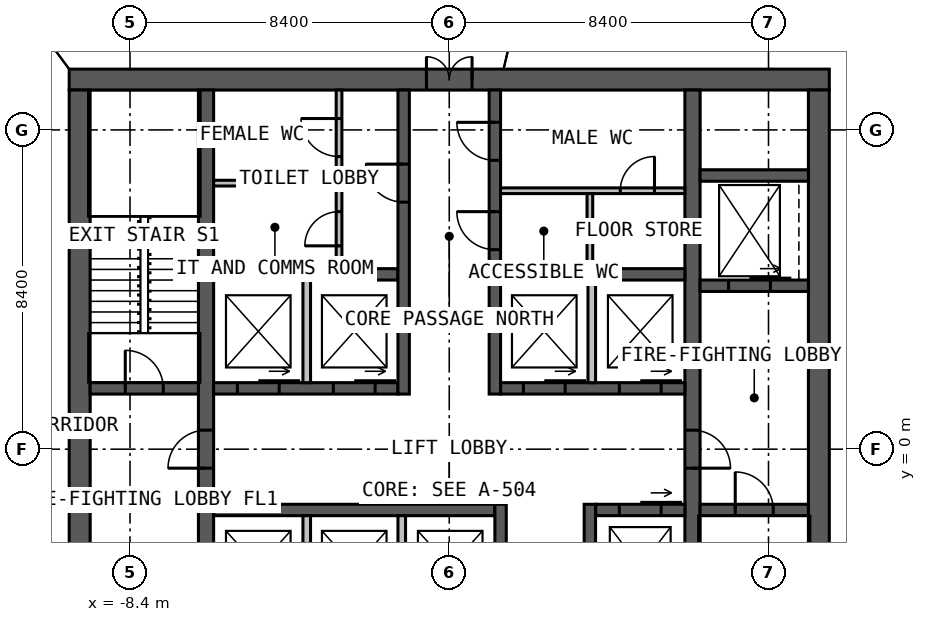
"""IFC4 building model, lengths in metres.
Left out: names, types, materials, properties, quantities, classifications, styles, units other than length and angle.
Written with IfcOpenShell. Run it as: python <this file> out.ifc"""

import sys

from ifc_helpers import new_model, si_unit, direction, frame, frame_2d, origin, place, context, subcontext, project, spatial, rectangle, extrude, element, fill, save


model = new_model("IFC4")
c1 = context("Model", 3, precision=1e-05, world=origin(), true_north=direction((0.0, 1.0)))
c2 = subcontext(c1, "Body", "Model", "MODEL_VIEW")
j1 = project(units=[si_unit("LENGTHUNIT", "METRE"), si_unit("PLANEANGLEUNIT", "RADIAN")], contexts=[c1])
p1 = place(None, origin())
s1 = spatial("IfcSite", under=j1, at=p1, CompositionType="ELEMENT")
p2 = place(p1, origin())
s2 = spatial("IfcBuilding", under=s1, at=p2, CompositionType="ELEMENT")
p3 = place(p2, frame((0.0, 0.0, 106.0)))
s3 = spatial("IfcBuildingStorey", under=s2, at=p3, CompositionType="ELEMENT", Elevation=106.0)
p4 = place(p3, frame((-10.0, 9.725, 0.0), z_axis=(0.0, 0.0, 1.0), x_axis=(1.0, 0.0, 0.0)))
e1 = element("IfcWall", 1, at=p4, inside=s3, PredefinedType="SOLIDWALL", context=c2, shape_type="SweptSolid", body=[
    extrude(rectangle(XDim=20.0, YDim=0.55, at=frame_2d((10.0, 0.0))), origin(), (0.0, 0.0, 1.0), 4.0),
])
p5 = place(p4, frame((9.4, 0.0, 0.0)))
e2 = element("IfcOpeningElement", 2, at=p5, cuts=e1, PredefinedType="OPENING", context=c2, shape_type="SweptSolid", body=[
    extrude(rectangle(XDim=1.2, YDim=2.2, at=frame_2d((0.6, 1.1))), frame((0.0, 0.285, 0.0), z_axis=(0.0, -1.0, 0.0), x_axis=(1.0, 0.0, 0.0)), (0.0, 0.0, 1.0), 0.57),
])
for number, where, z_axis, x_axis in (
    (3, (9.725, -9.45, 0.0), (0.0, 0.0, 1.0), (0.0, 1.0, 0.0)),
    (4, (-9.725, 9.45, 0.0), (0.0, 0.0, 1.0), (0.0, -1.0, 0.0)),
):
    element("IfcWall", number, at=place(p3, frame(where, z_axis=z_axis, x_axis=x_axis)), inside=s3, PredefinedType="SOLIDWALL", context=c2, shape_type="SweptSolid", body=[
        extrude(rectangle(XDim=18.9, YDim=0.55, at=frame_2d((9.45, 0.0))), origin(), (0.0, 0.0, 1.0), 4.0),
    ])
p6 = place(p3, frame((-6.4, -9.45, 0.0), z_axis=(0.0, 0.0, 1.0), x_axis=(0.0, 1.0, 0.0)))
e5 = element("IfcWall", 5, at=p6, inside=s3, PredefinedType="SOLIDWALL", context=c2, shape_type="SweptSolid", body=[
    extrude(rectangle(XDim=18.9, YDim=0.4, at=frame_2d((9.45, 0.0))), origin(), (0.0, 0.0, 1.0), 4.0),
])
p7 = place(p6, frame((8.95, 0.0, 0.0)))
e6 = element("IfcOpeningElement", 6, at=p7, cuts=e5, PredefinedType="OPENING", context=c2, shape_type="SweptSolid", body=[
    extrude(rectangle(XDim=1.0, YDim=2.2, at=frame_2d((0.5, 1.1))), frame((0.0, 0.21, 0.0), z_axis=(0.0, -1.0, 0.0), x_axis=(1.0, 0.0, 0.0)), (0.0, 0.0, 1.0), 0.42),
])
p8 = place(p3, frame((6.4, 9.45, 0.0), z_axis=(0.0, 0.0, 1.0), x_axis=(0.0, -1.0, 0.0)))
e7 = element("IfcWall", 7, at=p8, inside=s3, PredefinedType="SOLIDWALL", context=c2, shape_type="SweptSolid", body=[
    extrude(rectangle(XDim=18.9, YDim=0.4, at=frame_2d((9.45, 0.0))), origin(), (0.0, 0.0, 1.0), 4.0),
])
p9 = place(p8, frame((8.95, 0.0, 0.0)))
e8 = element("IfcOpeningElement", 8, at=p9, cuts=e7, PredefinedType="OPENING", context=c2, shape_type="SweptSolid", body=[
    extrude(rectangle(XDim=1.0, YDim=2.2, at=frame_2d((0.5, 1.1))), frame((0.0, 0.21, 0.0), z_axis=(0.0, -1.0, 0.0), x_axis=(1.0, 0.0, 0.0)), (0.0, 0.0, 1.0), 0.42),
])
p10 = place(p3, frame((-6.2, 1.6, 0.0), z_axis=(0.0, 0.0, 1.0), x_axis=(1.0, 0.0, 0.0)))
e9 = element("IfcWall", 9, at=p10, inside=s3, PredefinedType="SOLIDWALL", context=c2, shape_type="SweptSolid", body=[
    extrude(rectangle(XDim=4.85, YDim=0.3, at=frame_2d((2.425, 0.0))), origin(), (0.0, 0.0, 1.0), 4.0),
])
p11 = place(p10, frame((0.625, 0.0, 0.0)))
e10 = element("IfcOpeningElement", 10, at=p11, cuts=e9, PredefinedType="OPENING", context=c2, shape_type="SweptSolid", body=[
    extrude(rectangle(XDim=1.1, YDim=2.2, at=frame_2d((0.55, 1.1))), frame((0.0, 0.16, 0.0), z_axis=(0.0, -1.0, 0.0), x_axis=(1.0, 0.0, 0.0)), (0.0, 0.0, 1.0), 0.32),
])
p12 = place(p10, frame((3.15, 0.0, 0.0)))
e11 = element("IfcOpeningElement", 11, at=p12, cuts=e9, PredefinedType="OPENING", context=c2, shape_type="SweptSolid", body=[
    extrude(rectangle(XDim=1.1, YDim=2.2, at=frame_2d((0.55, 1.1))), frame((0.0, 0.16, 0.0), z_axis=(0.0, -1.0, 0.0), x_axis=(1.0, 0.0, 0.0)), (0.0, 0.0, 1.0), 0.32),
])
p13 = place(p3, frame((1.35, 1.6, 0.0), z_axis=(0.0, 0.0, 1.0), x_axis=(1.0, 0.0, 0.0)))
e12 = element("IfcWall", 12, at=p13, inside=s3, PredefinedType="SOLIDWALL", context=c2, shape_type="SweptSolid", body=[
    extrude(rectangle(XDim=4.85, YDim=0.3, at=frame_2d((2.425, 0.0))), origin(), (0.0, 0.0, 1.0), 4.0),
])
p14 = place(p13, frame((0.6, 0.0, 0.0)))
e13 = element("IfcOpeningElement", 13, at=p14, cuts=e12, PredefinedType="OPENING", context=c2, shape_type="SweptSolid", body=[
    extrude(rectangle(XDim=1.1, YDim=2.2, at=frame_2d((0.55, 1.1))), frame((0.0, 0.16, 0.0), z_axis=(0.0, -1.0, 0.0), x_axis=(1.0, 0.0, 0.0)), (0.0, 0.0, 1.0), 0.32),
])
p15 = place(p13, frame((3.125, 0.0, 0.0)))
e14 = element("IfcOpeningElement", 14, at=p15, cuts=e12, PredefinedType="OPENING", context=c2, shape_type="SweptSolid", body=[
    extrude(rectangle(XDim=1.1, YDim=2.2, at=frame_2d((0.55, 1.1))), frame((0.0, 0.16, 0.0), z_axis=(0.0, -1.0, 0.0), x_axis=(1.0, 0.0, 0.0)), (0.0, 0.0, 1.0), 0.32),
])
for number, where, z_axis, x_axis in (
    (15, (-6.2, 4.6, 0.0), (0.0, 0.0, 1.0), (1.0, 0.0, 0.0)),
    (16, (1.35, 4.6, 0.0), (0.0, 0.0, 1.0), (1.0, 0.0, 0.0)),
):
    element("IfcWall", number, at=place(p3, frame(where, z_axis=z_axis, x_axis=x_axis)), inside=s3, PredefinedType="SOLIDWALL", context=c2, shape_type="SweptSolid", body=[
        extrude(rectangle(XDim=4.85, YDim=0.3, at=frame_2d((2.425, 0.0))), origin(), (0.0, 0.0, 1.0), 4.0),
    ])
p16 = place(p3, frame((-1.2, 1.45, 0.0), z_axis=(0.0, 0.0, 1.0), x_axis=(0.0, 1.0, 0.0)))
e17 = element("IfcWall", 17, at=p16, inside=s3, PredefinedType="SOLIDWALL", context=c2, shape_type="SweptSolid", body=[
    extrude(rectangle(XDim=8.0, YDim=0.3, at=frame_2d((4.0, 0.0))), origin(), (0.0, 0.0, 1.0), 4.0),
])
p17 = place(p16, frame((5.05, 0.0, 0.0)))
e18 = element("IfcOpeningElement", 18, at=p17, cuts=e17, PredefinedType="OPENING", context=c2, shape_type="SweptSolid", body=[
    extrude(rectangle(XDim=1.0, YDim=2.2, at=frame_2d((0.5, 1.1))), frame((0.0, 0.16, 0.0), z_axis=(0.0, -1.0, 0.0), x_axis=(1.0, 0.0, 0.0)), (0.0, 0.0, 1.0), 0.32),
])
p18 = place(p3, frame((1.2, 1.45, 0.0), z_axis=(0.0, 0.0, 1.0), x_axis=(0.0, 1.0, 0.0)))
e19 = element("IfcWall", 19, at=p18, inside=s3, PredefinedType="SOLIDWALL", context=c2, shape_type="SweptSolid", body=[
    extrude(rectangle(XDim=8.0, YDim=0.3, at=frame_2d((4.0, 0.0))), origin(), (0.0, 0.0, 1.0), 4.0),
])
p19 = place(p18, frame((3.8, 0.0, 0.0)))
e20 = element("IfcOpeningElement", 20, at=p19, cuts=e19, PredefinedType="OPENING", context=c2, shape_type="SweptSolid", body=[
    extrude(rectangle(XDim=1.0, YDim=2.2, at=frame_2d((0.5, 1.1))), frame((0.0, 0.16, 0.0), z_axis=(0.0, -1.0, 0.0), x_axis=(1.0, 0.0, 0.0)), (0.0, 0.0, 1.0), 0.32),
])
p20 = place(p18, frame((6.15, 0.0, 0.0)))
e21 = element("IfcOpeningElement", 21, at=p20, cuts=e19, PredefinedType="OPENING", context=c2, shape_type="SweptSolid", body=[
    extrude(rectangle(XDim=1.0, YDim=2.2, at=frame_2d((0.5, 1.1))), frame((0.0, 0.16, 0.0), z_axis=(0.0, -1.0, 0.0), x_axis=(1.0, 0.0, 0.0)), (0.0, 0.0, 1.0), 0.32),
])
p21 = place(p3, frame((-6.2, -1.6, 0.0), z_axis=(0.0, 0.0, 1.0), x_axis=(1.0, 0.0, 0.0)))
e22 = element("IfcWall", 22, at=p21, inside=s3, PredefinedType="SOLIDWALL", context=c2, shape_type="SweptSolid", body=[
    extrude(rectangle(XDim=7.4, YDim=0.3, at=frame_2d((3.7, 0.0))), origin(), (0.0, 0.0, 1.0), 4.0),
])
p22 = place(p3, frame((3.85, -1.6, 0.0), z_axis=(0.0, 0.0, 1.0), x_axis=(1.0, 0.0, 0.0)))
e23 = element("IfcWall", 23, at=p22, inside=s3, PredefinedType="SOLIDWALL", context=c2, shape_type="SweptSolid", body=[
    extrude(rectangle(XDim=2.35, YDim=0.3, at=frame_2d((1.175, 0.0))), origin(), (0.0, 0.0, 1.0), 4.0),
])
p23 = place(p22, frame((0.625, 0.0, 0.0)))
e24 = element("IfcOpeningElement", 24, at=p23, cuts=e23, PredefinedType="OPENING", context=c2, shape_type="SweptSolid", body=[
    extrude(rectangle(XDim=1.1, YDim=2.2, at=frame_2d((0.55, 1.1))), frame((0.0, 0.16, 0.0), z_axis=(0.0, -1.0, 0.0), x_axis=(1.0, 0.0, 0.0)), (0.0, 0.0, 1.0), 0.32),
])
p24 = place(p3, frame((1.35, -1.45, 0.0), z_axis=(0.0, 0.0, 1.0), x_axis=(0.0, -1.0, 0.0)))
e25 = element("IfcWall", 25, at=p24, inside=s3, PredefinedType="SOLIDWALL", context=c2, shape_type="SweptSolid", body=[
    extrude(rectangle(XDim=8.0, YDim=0.3, at=frame_2d((4.0, 0.0))), origin(), (0.0, 0.0, 1.0), 4.0),
])
p25 = place(p24, frame((5.925, 0.0, 0.0)))
e26 = element("IfcOpeningElement", 26, at=p25, cuts=e25, PredefinedType="OPENING", context=c2, shape_type="SweptSolid", body=[
    extrude(rectangle(XDim=1.0, YDim=2.2, at=frame_2d((0.5, 1.1))), frame((0.0, 0.16, 0.0), z_axis=(0.0, -1.0, 0.0), x_axis=(1.0, 0.0, 0.0)), (0.0, 0.0, 1.0), 0.32),
])
p26 = place(p24, frame((3.525, 0.0, 0.0)))
e27 = element("IfcOpeningElement", 27, at=p26, cuts=e25, PredefinedType="OPENING", context=c2, shape_type="SweptSolid", body=[
    extrude(rectangle(XDim=0.9, YDim=2.2, at=frame_2d((0.45, 1.1))), frame((0.0, 0.16, 0.0), z_axis=(0.0, -1.0, 0.0), x_axis=(1.0, 0.0, 0.0)), (0.0, 0.0, 1.0), 0.32),
])
p27 = place(p3, frame((3.7, -1.45, 0.0), z_axis=(0.0, 0.0, 1.0), x_axis=(0.0, -1.0, 0.0)))
e28 = element("IfcWall", 28, at=p27, inside=s3, PredefinedType="SOLIDWALL", context=c2, shape_type="SweptSolid", body=[
    extrude(rectangle(XDim=8.0, YDim=0.3, at=frame_2d((4.0, 0.0))), origin(), (0.0, 0.0, 1.0), 4.0),
])
p28 = place(p27, frame((5.1, 0.0, 0.0)))
e29 = element("IfcOpeningElement", 29, at=p28, cuts=e28, PredefinedType="OPENING", context=c2, shape_type="SweptSolid", body=[
    extrude(rectangle(XDim=0.9, YDim=2.2, at=frame_2d((0.45, 1.1))), frame((0.0, 0.16, 0.0), z_axis=(0.0, -1.0, 0.0), x_axis=(1.0, 0.0, 0.0)), (0.0, 0.0, 1.0), 0.32),
])
p29 = place(p3, frame((-9.45, 1.6, 0.0), z_axis=(0.0, 0.0, 1.0), x_axis=(1.0, 0.0, 0.0)))
e30 = element("IfcWall", 30, at=p29, inside=s3, PredefinedType="SOLIDWALL", context=c2, shape_type="SweptSolid", body=[
    extrude(rectangle(XDim=2.85, YDim=0.3, at=frame_2d((1.425, 0.0))), origin(), (0.0, 0.0, 1.0), 4.0),
])
p30 = place(p29, frame((0.925, 0.0, 0.0)))
e31 = element("IfcOpeningElement", 31, at=p30, cuts=e30, PredefinedType="OPENING", context=c2, shape_type="SweptSolid", body=[
    extrude(rectangle(XDim=1.0, YDim=2.2, at=frame_2d((0.5, 1.1))), frame((0.0, 0.16, 0.0), z_axis=(0.0, -1.0, 0.0), x_axis=(1.0, 0.0, 0.0)), (0.0, 0.0, 1.0), 0.32),
])
p31 = place(p3, frame((6.6, -1.6, 0.0), z_axis=(0.0, 0.0, 1.0), x_axis=(1.0, 0.0, 0.0)))
e32 = element("IfcWall", 32, at=p31, inside=s3, PredefinedType="SOLIDWALL", context=c2, shape_type="SweptSolid", body=[
    extrude(rectangle(XDim=2.85, YDim=0.3, at=frame_2d((1.425, 0.0))), origin(), (0.0, 0.0, 1.0), 4.0),
])
p32 = place(p31, frame((0.925, 0.0, 0.0)))
e33 = element("IfcOpeningElement", 33, at=p32, cuts=e32, PredefinedType="OPENING", context=c2, shape_type="SweptSolid", body=[
    extrude(rectangle(XDim=1.0, YDim=2.2, at=frame_2d((0.5, 1.1))), frame((0.0, 0.16, 0.0), z_axis=(0.0, -1.0, 0.0), x_axis=(1.0, 0.0, 0.0)), (0.0, 0.0, 1.0), 0.32),
])
p33 = place(p3, frame((6.6, 4.3, 0.0), z_axis=(0.0, 0.0, 1.0), x_axis=(1.0, 0.0, 0.0)))
e34 = element("IfcWall", 34, at=p33, inside=s3, PredefinedType="SOLIDWALL", context=c2, shape_type="SweptSolid", body=[
    extrude(rectangle(XDim=2.85, YDim=0.3, at=frame_2d((1.425, 0.0))), origin(), (0.0, 0.0, 1.0), 4.0),
])
p34 = place(p33, frame((0.75, 0.0, 0.0)))
e35 = element("IfcOpeningElement", 35, at=p34, cuts=e34, PredefinedType="OPENING", context=c2, shape_type="SweptSolid", body=[
    extrude(rectangle(XDim=1.1, YDim=2.2, at=frame_2d((0.55, 1.1))), frame((0.0, 0.16, 0.0), z_axis=(0.0, -1.0, 0.0), x_axis=(1.0, 0.0, 0.0)), (0.0, 0.0, 1.0), 0.32),
])
p35 = place(p3, frame((6.6, 7.2, 0.0), z_axis=(0.0, 0.0, 1.0), x_axis=(1.0, 0.0, 0.0)))
e36 = element("IfcWall", 36, at=p35, inside=s3, PredefinedType="SOLIDWALL", context=c2, shape_type="SweptSolid", body=[
    extrude(rectangle(XDim=2.85, YDim=0.3, at=frame_2d((1.425, 0.0))), origin(), (0.0, 0.0, 1.0), 4.0),
])
for number, where, z_axis, x_axis in (
    (37, (-3.75, 1.75, 0.0), (0.0, 0.0, 1.0), (0.0, 1.0, 0.0)),
    (38, (3.75, 1.75, 0.0), (0.0, 0.0, 1.0), (0.0, 1.0, 0.0)),
    (39, (-3.75, -1.75, 0.0), (0.0, 0.0, 1.0), (0.0, -1.0, 0.0)),
    (40, (-1.25, -1.75, 0.0), (0.0, 0.0, 1.0), (0.0, -1.0, 0.0)),
):
    element("IfcWall", number, at=place(p3, frame(where, z_axis=z_axis, x_axis=x_axis)), inside=s3, PredefinedType="SOLIDWALL", context=c2, shape_type="SweptSolid", body=[
        extrude(rectangle(XDim=2.7, YDim=0.2, at=frame_2d((1.35, 0.0))), origin(), (0.0, 0.0, 1.0), 3.75),
    ])
p36 = place(p3, frame((1.35, 6.8, 0.0), z_axis=(0.0, 0.0, 1.0), x_axis=(1.0, 0.0, 0.0)))
e41 = element("IfcWall", 41, at=p36, inside=s3, PredefinedType="PARTITIONING", context=c2, shape_type="SweptSolid", body=[
    extrude(rectangle(XDim=4.85, YDim=0.15, at=frame_2d((2.425, 0.0))), origin(), (0.0, 0.0, 1.0), 3.75),
])
p37 = place(p36, frame((3.15, 0.0, 0.0)))
e42 = element("IfcOpeningElement", 42, at=p37, cuts=e41, PredefinedType="OPENING", context=c2, shape_type="SweptSolid", body=[
    extrude(rectangle(XDim=0.9, YDim=2.2, at=frame_2d((0.45, 1.1))), frame((0.0, 0.085, 0.0), z_axis=(0.0, -1.0, 0.0), x_axis=(1.0, 0.0, 0.0)), (0.0, 0.0, 1.0), 0.17),
])
p38 = place(p3, frame((3.7, 4.75, 0.0), z_axis=(0.0, 0.0, 1.0), x_axis=(0.0, 1.0, 0.0)))
e43 = element("IfcWall", 43, at=p38, inside=s3, PredefinedType="PARTITIONING", context=c2, shape_type="SweptSolid", body=[
    extrude(rectangle(XDim=1.975, YDim=0.15, at=frame_2d((0.988, 0.0))), origin(), (0.0, 0.0, 1.0), 3.75),
])
p39 = place(p3, frame((-2.9, 4.75, 0.0), z_axis=(0.0, 0.0, 1.0), x_axis=(0.0, 1.0, 0.0)))
e44 = element("IfcWall", 44, at=p39, inside=s3, PredefinedType="PARTITIONING", context=c2, shape_type="SweptSolid", body=[
    extrude(rectangle(XDim=4.7, YDim=0.15, at=frame_2d((2.35, 0.0))), origin(), (0.0, 0.0, 1.0), 3.75),
])
p40 = place(p39, frame((2.95, 0.0, 0.0)))
e45 = element("IfcOpeningElement", 45, at=p40, cuts=e44, PredefinedType="OPENING", context=c2, shape_type="SweptSolid", body=[
    extrude(rectangle(XDim=1.0, YDim=2.2, at=frame_2d((0.5, 1.1))), frame((0.0, 0.085, 0.0), z_axis=(0.0, -1.0, 0.0), x_axis=(1.0, 0.0, 0.0)), (0.0, 0.0, 1.0), 0.17),
])
p41 = place(p39, frame((0.6, 0.0, 0.0)))
e46 = element("IfcOpeningElement", 46, at=p41, cuts=e44, PredefinedType="OPENING", context=c2, shape_type="SweptSolid", body=[
    extrude(rectangle(XDim=0.9, YDim=2.2, at=frame_2d((0.45, 1.1))), frame((0.0, 0.085, 0.0), z_axis=(0.0, -1.0, 0.0), x_axis=(1.0, 0.0, 0.0)), (0.0, 0.0, 1.0), 0.17),
])
p42 = place(p3, frame((-6.2, 7.0, 0.0), z_axis=(0.0, 0.0, 1.0), x_axis=(1.0, 0.0, 0.0)))
e47 = element("IfcWall", 47, at=p42, inside=s3, PredefinedType="PARTITIONING", context=c2, shape_type="SweptSolid", body=[
    extrude(rectangle(XDim=3.225, YDim=0.15, at=frame_2d((1.612, 0.0))), origin(), (0.0, 0.0, 1.0), 3.75),
])
p43 = place(p5, origin())
e48 = element("IfcDoor", 48, at=p43, inside=s3, OperationType="DOUBLE_DOOR_SINGLE_SWING", PredefinedType="DOOR", context=c2, shape_type="SweptSolid", body=[
    extrude(rectangle(XDim=1.2, YDim=2.2, at=frame_2d((0.6, 1.1))), frame((0.0, 0.025, 0.0), z_axis=(0.0, -1.0, 0.0), x_axis=(1.0, 0.0, 0.0)), (0.0, 0.0, 1.0), 0.05),
])
fill(e2, e48)
p44 = place(p7, origin())
e49 = element("IfcDoor", 49, at=p44, inside=s3, OperationType="SINGLE_SWING_LEFT", PredefinedType="DOOR", context=c2, shape_type="SweptSolid", body=[
    extrude(rectangle(XDim=1.0, YDim=2.2, at=frame_2d((0.5, 1.1))), frame((0.0, 0.025, 0.0), z_axis=(0.0, -1.0, 0.0), x_axis=(1.0, 0.0, 0.0)), (0.0, 0.0, 1.0), 0.05),
])
fill(e6, e49)
p45 = place(p9, origin())
e50 = element("IfcDoor", 50, at=p45, inside=s3, OperationType="SINGLE_SWING_RIGHT", PredefinedType="DOOR", context=c2, shape_type="SweptSolid", body=[
    extrude(rectangle(XDim=1.0, YDim=2.2, at=frame_2d((0.5, 1.1))), frame((0.0, 0.025, 0.0), z_axis=(0.0, -1.0, 0.0), x_axis=(1.0, 0.0, 0.0)), (0.0, 0.0, 1.0), 0.05),
])
fill(e8, e50)
p46 = place(p30, origin())
e51 = element("IfcDoor", 51, at=p46, inside=s3, OperationType="SINGLE_SWING_LEFT", PredefinedType="DOOR", context=c2, shape_type="SweptSolid", body=[
    extrude(rectangle(XDim=1.0, YDim=2.2, at=frame_2d((0.5, 1.1))), frame((0.0, 0.025, 0.0), z_axis=(0.0, -1.0, 0.0), x_axis=(1.0, 0.0, 0.0)), (0.0, 0.0, 1.0), 0.05),
])
fill(e31, e51)
p47 = place(p32, origin())
e52 = element("IfcDoor", 52, at=p47, inside=s3, OperationType="SINGLE_SWING_LEFT", PredefinedType="DOOR", context=c2, shape_type="SweptSolid", body=[
    extrude(rectangle(XDim=1.0, YDim=2.2, at=frame_2d((0.5, 1.1))), frame((0.0, 0.025, 0.0), z_axis=(0.0, -1.0, 0.0), x_axis=(1.0, 0.0, 0.0)), (0.0, 0.0, 1.0), 0.05),
])
fill(e33, e52)
p48 = place(p17, origin())
e53 = element("IfcDoor", 53, at=p48, inside=s3, OperationType="SINGLE_SWING_RIGHT", PredefinedType="DOOR", context=c2, shape_type="SweptSolid", body=[
    extrude(rectangle(XDim=1.0, YDim=2.2, at=frame_2d((0.5, 1.1))), frame((0.0, 0.025, 0.0), z_axis=(0.0, -1.0, 0.0), x_axis=(1.0, 0.0, 0.0)), (0.0, 0.0, 1.0), 0.05),
])
fill(e18, e53)
p49 = place(p19, origin())
e54 = element("IfcDoor", 54, at=p49, inside=s3, OperationType="SINGLE_SWING_RIGHT", PredefinedType="DOOR", context=c2, shape_type="SweptSolid", body=[
    extrude(rectangle(XDim=1.0, YDim=2.2, at=frame_2d((0.5, 1.1))), frame((0.0, 0.025, 0.0), z_axis=(0.0, -1.0, 0.0), x_axis=(1.0, 0.0, 0.0)), (0.0, 0.0, 1.0), 0.05),
])
fill(e20, e54)
p50 = place(p20, origin())
e55 = element("IfcDoor", 55, at=p50, inside=s3, OperationType="SINGLE_SWING_RIGHT", PredefinedType="DOOR", context=c2, shape_type="SweptSolid", body=[
    extrude(rectangle(XDim=1.0, YDim=2.2, at=frame_2d((0.5, 1.1))), frame((0.0, 0.025, 0.0), z_axis=(0.0, -1.0, 0.0), x_axis=(1.0, 0.0, 0.0)), (0.0, 0.0, 1.0), 0.05),
])
fill(e21, e55)
p51 = place(p37, origin())
e56 = element("IfcDoor", 56, at=p51, inside=s3, OperationType="SINGLE_SWING_RIGHT", PredefinedType="DOOR", context=c2, shape_type="SweptSolid", body=[
    extrude(rectangle(XDim=0.9, YDim=2.2, at=frame_2d((0.45, 1.1))), frame((0.0, 0.025, 0.0), z_axis=(0.0, -1.0, 0.0), x_axis=(1.0, 0.0, 0.0)), (0.0, 0.0, 1.0), 0.05),
])
fill(e42, e56)
p52 = place(p40, origin())
e57 = element("IfcDoor", 57, at=p52, inside=s3, OperationType="SINGLE_SWING_RIGHT", PredefinedType="DOOR", context=c2, shape_type="SweptSolid", body=[
    extrude(rectangle(XDim=1.0, YDim=2.2, at=frame_2d((0.5, 1.1))), frame((0.0, 0.025, 0.0), z_axis=(0.0, -1.0, 0.0), x_axis=(1.0, 0.0, 0.0)), (0.0, 0.0, 1.0), 0.05),
])
fill(e45, e57)
p53 = place(p41, origin())
e58 = element("IfcDoor", 58, at=p53, inside=s3, OperationType="SINGLE_SWING_LEFT", PredefinedType="DOOR", context=c2, shape_type="SweptSolid", body=[
    extrude(rectangle(XDim=0.9, YDim=2.2, at=frame_2d((0.45, 1.1))), frame((0.0, 0.025, 0.0), z_axis=(0.0, -1.0, 0.0), x_axis=(1.0, 0.0, 0.0)), (0.0, 0.0, 1.0), 0.05),
])
fill(e46, e58)
p54 = place(p11, origin())
e59 = element("IfcDoor", 59, at=p54, inside=s3, OperationType="SLIDING_TO_LEFT", PredefinedType="DOOR", context=c2, shape_type="SweptSolid", body=[
    extrude(rectangle(XDim=1.1, YDim=2.2, at=frame_2d((0.55, 1.1))), frame((0.0, 0.025, 0.0), z_axis=(0.0, -1.0, 0.0), x_axis=(1.0, 0.0, 0.0)), (0.0, 0.0, 1.0), 0.05),
])
fill(e10, e59)
p55 = place(p12, origin())
e60 = element("IfcDoor", 60, at=p55, inside=s3, OperationType="SLIDING_TO_LEFT", PredefinedType="DOOR", context=c2, shape_type="SweptSolid", body=[
    extrude(rectangle(XDim=1.1, YDim=2.2, at=frame_2d((0.55, 1.1))), frame((0.0, 0.025, 0.0), z_axis=(0.0, -1.0, 0.0), x_axis=(1.0, 0.0, 0.0)), (0.0, 0.0, 1.0), 0.05),
])
fill(e11, e60)
p56 = place(p14, origin())
e61 = element("IfcDoor", 61, at=p56, inside=s3, OperationType="SLIDING_TO_LEFT", PredefinedType="DOOR", context=c2, shape_type="SweptSolid", body=[
    extrude(rectangle(XDim=1.1, YDim=2.2, at=frame_2d((0.55, 1.1))), frame((0.0, 0.025, 0.0), z_axis=(0.0, -1.0, 0.0), x_axis=(1.0, 0.0, 0.0)), (0.0, 0.0, 1.0), 0.05),
])
fill(e13, e61)
p57 = place(p15, origin())
e62 = element("IfcDoor", 62, at=p57, inside=s3, OperationType="SLIDING_TO_LEFT", PredefinedType="DOOR", context=c2, shape_type="SweptSolid", body=[
    extrude(rectangle(XDim=1.1, YDim=2.2, at=frame_2d((0.55, 1.1))), frame((0.0, 0.025, 0.0), z_axis=(0.0, -1.0, 0.0), x_axis=(1.0, 0.0, 0.0)), (0.0, 0.0, 1.0), 0.05),
])
fill(e14, e62)
p58 = place(p23, origin())
e63 = element("IfcDoor", 63, at=p58, inside=s3, OperationType="SLIDING_TO_LEFT", PredefinedType="DOOR", context=c2, shape_type="SweptSolid", body=[
    extrude(rectangle(XDim=1.1, YDim=2.2, at=frame_2d((0.55, 1.1))), frame((0.0, 0.025, 0.0), z_axis=(0.0, -1.0, 0.0), x_axis=(1.0, 0.0, 0.0)), (0.0, 0.0, 1.0), 0.05),
])
fill(e24, e63)
p59 = place(p34, origin())
e64 = element("IfcDoor", 64, at=p59, inside=s3, OperationType="SLIDING_TO_LEFT", PredefinedType="DOOR", context=c2, shape_type="SweptSolid", body=[
    extrude(rectangle(XDim=1.1, YDim=2.2, at=frame_2d((0.55, 1.1))), frame((0.0, 0.025, 0.0), z_axis=(0.0, -1.0, 0.0), x_axis=(1.0, 0.0, 0.0)), (0.0, 0.0, 1.0), 0.05),
])
fill(e35, e64)
save(model, sys.argv[1])
